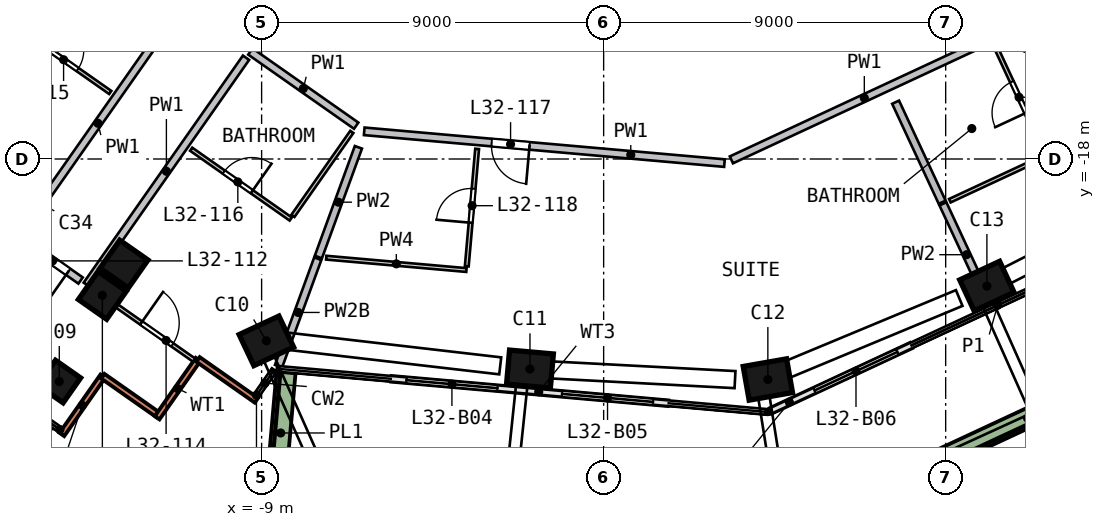
"""IFC4 building model, lengths in metres.
Left out: names, types, materials, properties, quantities, classifications, styles, units other than length and angle.
Written with IfcOpenShell. Run it as: python <this file> out.ifc"""

import sys

from ifc_helpers import new_model, si_unit, direction, frame, frame_2d, origin, origin_2d, place, context, subcontext, project, spatial, rectangle, extrude, element, fill, save


model = new_model("IFC4")
c1 = context("Model", 3, precision=1e-05, world=origin(), true_north=direction((0.0, 1.0)))
c2 = subcontext(c1, "Body", "Model", "MODEL_VIEW")
j1 = project(units=[si_unit("LENGTHUNIT", "METRE"), si_unit("PLANEANGLEUNIT", "RADIAN")], contexts=[c1])
p1 = place(None, origin())
s1 = spatial("IfcSite", under=j1, at=p1, CompositionType="ELEMENT")
p2 = place(p1, origin())
s2 = spatial("IfcBuilding", under=s1, at=p2, CompositionType="ELEMENT")
p3 = place(p2, frame((0.0, 0.0, 136.5)))
s3 = spatial("IfcBuildingStorey", under=s2, at=p3, CompositionType="ELEMENT", Elevation=136.5)
p4 = place(p3, frame((-14.461, -23.775, 0.0), z_axis=(0.113416824, -0.067670774, 0.991240279), x_axis=(0.810958398, -0.570087188, -0.131708295)))
e1 = element("IfcColumn", 1, at=p4, inside=s3, PredefinedType="COLUMN", context=c2, shape_type="SweptSolid", body=[
    extrude(rectangle(XDim=0.8, YDim=0.8, at=origin_2d()), origin(), (0.0, 0.0, 1.0), 3.218),
])
p5 = place(p3, frame((-9.006, -22.735, 0.0), z_axis=(0.108473902, -0.041884457, 0.993216545), x_axis=(-0.90066997, -0.427008184, 0.080359294)))
e2 = element("IfcColumn", 2, at=p5, inside=s3, PredefinedType="COLUMN", context=c2, shape_type="SweptSolid", body=[
    extrude(rectangle(XDim=1.15, YDim=0.9, at=origin_2d()), origin(), (0.0, 0.0, 1.0), 3.212),
])
p6 = place(p3, frame((-2.074, -23.517, 0.0), z_axis=(0.111946178, -0.008897896, 0.993674434), x_axis=(0.989847104, -0.087134884, -0.112295249)))
e3 = element("IfcColumn", 3, at=p6, inside=s3, PredefinedType="COLUMN", context=c2, shape_type="SweptSolid", body=[
    extrude(rectangle(XDim=1.15, YDim=0.9, at=origin_2d()), origin(), (0.0, 0.0, 1.0), 3.21),
])
p7 = place(p3, frame((4.184, -23.828, 0.0), z_axis=(0.113127235, 0.020907251, 0.993360516), x_axis=(-0.978316643, -0.172228343, 0.115038876)))
e4 = element("IfcColumn", 4, at=p7, inside=s3, PredefinedType="COLUMN", context=c2, shape_type="SweptSolid", body=[
    extrude(rectangle(XDim=1.15, YDim=0.9, at=origin_2d()), origin(), (0.0, 0.0, 1.0), 3.211),
])
p8 = place(p3, frame((9.962, -21.403, 0.0), z_axis=(0.101375651, 0.048216176, 0.993679112), x_axis=(0.90094221, 0.419168471, -0.112253848)))
e5 = element("IfcColumn", 5, at=p8, inside=s3, PredefinedType="COLUMN", context=c2, shape_type="SweptSolid", body=[
    extrude(rectangle(XDim=1.15, YDim=0.9, at=origin_2d()), origin(), (0.0, 0.0, 1.0), 3.21),
])
p9 = place(p3, frame((-12.741, -20.694, 0.0), z_axis=(0.098904408, -0.059753163, 0.993301303), x_axis=(-0.573373422, -0.81925695, 0.00780827)))
e6 = element("IfcColumn", 6, at=p9, inside=s3, PredefinedType="COLUMN", context=c2, shape_type="SweptSolid", body=[
    extrude(rectangle(XDim=0.9, YDim=0.9, at=origin_2d()), origin(), (0.0, 0.0, 1.0), 3.211),
])
p10 = place(p3, frame((-13.315, -21.513, 0.0), z_axis=(0.102724191, -0.062455093, 0.99274725), x_axis=(-0.573707052, -0.819023064, 0.007838281)))
e7 = element("IfcColumn", 7, at=p10, inside=s3, PredefinedType="COLUMN", context=c2, shape_type="SweptSolid", body=[
    extrude(rectangle(XDim=0.9, YDim=0.9, at=origin_2d()), origin(), (0.0, 0.0, 1.0), 3.213),
])
p11 = place(p3, frame((-14.256, -25.25, 0.0), z_axis=(0.0, 0.0, 1.0), x_axis=(0.574196146, 0.81871777, 0.0)))
e8 = element("IfcWall", 8, at=p11, inside=s3, PredefinedType="SOLIDWALL", context=c2, shape_type="SweptSolid", body=[
    extrude(rectangle(XDim=1.875, YDim=0.15, at=frame_2d((0.938, 0.0))), origin(), (0.0, 0.0, 1.0), 3.19),
])
p12 = place(p3, frame((-13.179, -23.715, 0.0), z_axis=(0.0, 0.0, 1.0), x_axis=(0.818734563, -0.574172201, 0.0)))
e9 = element("IfcWall", 9, at=p12, inside=s3, PredefinedType="SOLIDWALL", context=c2, shape_type="SweptSolid", body=[
    extrude(rectangle(XDim=1.8, YDim=0.15, at=frame_2d((0.9, 0.0))), origin(), (0.0, 0.0, 1.0), 3.19),
])
for number, where, z_axis, x_axis in (
    (10, (-11.749, -24.81, 0.0), (0.0, 0.0, 1.0), (0.574, 0.819, 0.0)),
    (11, (-10.672, -23.274, 0.0), (0.0, 0.0, 1.0), (0.819, -0.574, 0.0)),
):
    element("IfcWall", number, at=place(p3, frame(where, z_axis=z_axis, x_axis=x_axis)), inside=s3, PredefinedType="SOLIDWALL", context=c2, shape_type="SweptSolid", body=[
        extrude(rectangle(XDim=1.875, YDim=0.15, at=frame_2d((0.938, 0.0))), origin(), (0.0, 0.0, 1.0), 3.19),
    ])
p13 = place(p3, frame((-5.586, -23.784, 0.0), z_axis=(0.0, 0.0, 1.0), x_axis=(0.996130393, -0.087887659, 0.0)))
e12 = element("IfcWall", 12, at=p13, inside=s3, PredefinedType="SOLIDWALL", context=c2, shape_type="SweptSolid", body=[
    extrude(rectangle(XDim=3.475, YDim=0.15, at=frame_2d((1.738, 0.0))), origin(), (0.0, 0.0, 1.0), 2.475),
])
p14 = place(p13, frame((0.4, 0.0, 0.0)))
e13 = element("IfcOpeningElement", 13, at=p14, cuts=e12, PredefinedType="OPENING", context=c2, shape_type="SweptSolid", body=[
    extrude(rectangle(XDim=2.4, YDim=2.4, at=frame_2d((1.2, 1.2))), frame((0.0, 0.085, 0.0), z_axis=(0.0, -1.0, 0.0), x_axis=(1.0, 0.0, 0.0)), (0.0, 0.0, 1.0), 0.17),
])
p15 = place(p3, frame((-2.125, -24.09, 0.0), z_axis=(0.0, 0.0, 1.0), x_axis=(0.996134275, -0.087843651, 0.0)))
e14 = element("IfcWall", 14, at=p15, inside=s3, PredefinedType="SOLIDWALL", context=c2, shape_type="SweptSolid", body=[
    extrude(rectangle(XDim=3.835, YDim=0.15, at=frame_2d((1.918, 0.0))), origin(), (0.0, 0.0, 1.0), 2.475),
])
p16 = place(p15, frame((1.035, 0.0, 0.0)))
e15 = element("IfcOpeningElement", 15, at=p16, cuts=e14, PredefinedType="OPENING", context=c2, shape_type="SweptSolid", body=[
    extrude(rectangle(XDim=2.4, YDim=2.4, at=frame_2d((1.2, 1.2))), frame((0.0, 0.085, 0.0), z_axis=(0.0, -1.0, 0.0), x_axis=(1.0, 0.0, 0.0)), (0.0, 0.0, 1.0), 0.17),
])
p17 = place(p3, frame((4.403, -24.625, 0.0), z_axis=(0.0, 0.0, 1.0), x_axis=(0.906607397, 0.42197515, 0.0)))
e16 = element("IfcWall", 16, at=p17, inside=s3, PredefinedType="SOLIDWALL", context=c2, shape_type="SweptSolid", body=[
    extrude(rectangle(XDim=4.068, YDim=0.15, at=frame_2d((2.034, 0.0))), origin(), (0.0, 0.0, 1.0), 2.475),
])
p18 = place(p17, frame((1.268, 0.0, 0.0)))
e17 = element("IfcOpeningElement", 17, at=p18, cuts=e16, PredefinedType="OPENING", context=c2, shape_type="SweptSolid", body=[
    extrude(rectangle(XDim=2.4, YDim=2.4, at=frame_2d((1.2, 1.2))), frame((0.0, 0.085, 0.0), z_axis=(0.0, -1.0, 0.0), x_axis=(1.0, 0.0, 0.0)), (0.0, 0.0, 1.0), 0.17),
])
p19 = place(p3, frame((-8.357, -23.616, 0.0), z_axis=(0.0, 0.0, 1.0), x_axis=(-0.087920539, -0.996127491, 0.0)))
e18 = element("IfcWall", 18, at=p19, inside=s3, PredefinedType="SOLIDWALL", context=c2, shape_type="SweptSolid", body=[
    extrude(rectangle(XDim=3.199, YDim=0.5, at=frame_2d((1.6, 0.0))), origin(), (0.0, 0.0, 1.0), 0.7),
])
p20 = place(p3, frame((4.933, -27.715, 0.0), z_axis=(0.0, 0.0, 1.0), x_axis=(0.906607173, 0.421975632, 0.0)))
e19 = element("IfcWall", 19, at=p20, inside=s3, PredefinedType="SOLIDWALL", context=c2, shape_type="SweptSolid", body=[
    extrude(rectangle(XDim=13.724, YDim=0.5, at=frame_2d((6.862, 0.0))), origin(), (0.0, 0.0, 1.0), 0.7),
])
p21 = place(p3, frame((-13.763, -21.198, 0.0), z_axis=(0.0, 0.0, 1.0), x_axis=(-0.81872299, 0.574188702, 0.0)))
e20 = element("IfcWall", 20, at=p21, inside=s3, PredefinedType="SOLIDWALL", context=c2, shape_type="SweptSolid", body=[
    extrude(rectangle(XDim=1.804, YDim=0.2, at=frame_2d((0.902, 0.0))), origin(), (0.0, 0.0, 1.0), 3.19),
])
p22 = place(p21, frame((0.4, 0.0, 0.0)))
e21 = element("IfcOpeningElement", 21, at=p22, cuts=e20, PredefinedType="OPENING", context=c2, shape_type="SweptSolid", body=[
    extrude(rectangle(XDim=1.0, YDim=2.1, at=frame_2d((0.5, 1.05))), frame((0.0, 0.11, 0.0), z_axis=(0.0, -1.0, 0.0), x_axis=(1.0, 0.0, 0.0)), (0.0, 0.0, 1.0), 0.22),
])
p23 = place(p3, frame((-11.211, -14.072, 0.0), z_axis=(0.0, 0.0, 1.0), x_axis=(-0.57414226, -0.818755559, 0.0)))
e22 = element("IfcWall", 22, at=p23, inside=s3, PredefinedType="SOLIDWALL", context=c2, shape_type="SweptSolid", body=[
    extrude(rectangle(XDim=7.3, YDim=0.2, at=frame_2d((3.65, 0.0))), origin(), (0.0, 0.0, 1.0), 3.19),
])
p24 = place(p3, frame((-13.601, -21.312, 0.0), z_axis=(0.0, 0.0, 1.0), x_axis=(0.574126539, 0.818766583, 0.0)))
e23 = element("IfcWall", 23, at=p24, inside=s3, PredefinedType="SOLIDWALL", context=c2, shape_type="SweptSolid", body=[
    extrude(rectangle(XDim=7.3, YDim=0.2, at=frame_2d((3.65, 0.0))), origin(), (0.0, 0.0, 1.0), 3.19),
])
p25 = place(p3, frame((-9.295, -15.171, 0.0), z_axis=(0.0, 0.0, 1.0), x_axis=(0.818762763, -0.574131987, 0.0)))
e24 = element("IfcWall", 24, at=p25, inside=s3, PredefinedType="SOLIDWALL", context=c2, shape_type="SweptSolid", body=[
    extrude(rectangle(XDim=3.4, YDim=0.2, at=frame_2d((1.7, 0.0))), origin(), (0.0, 0.0, 1.0), 3.19),
])
p26 = place(p3, frame((3.179, -18.108, 0.0), z_axis=(0.0, 0.0, 1.0), x_axis=(-0.996131898, 0.087870599, 0.0)))
e25 = element("IfcWall", 25, at=p26, inside=s3, PredefinedType="SOLIDWALL", context=c2, shape_type="SweptSolid", body=[
    extrude(rectangle(XDim=9.516, YDim=0.2, at=frame_2d((4.758, 0.0))), origin(), (0.0, 0.0, 1.0), 3.19),
])
p27 = place(p26, frame((5.15, 0.0, 0.0)))
e26 = element("IfcOpeningElement", 26, at=p27, cuts=e25, PredefinedType="OPENING", context=c2, shape_type="SweptSolid", body=[
    extrude(rectangle(XDim=1.0, YDim=2.1, at=frame_2d((0.5, 1.05))), frame((0.0, 0.11, 0.0), z_axis=(0.0, -1.0, 0.0), x_axis=(1.0, 0.0, 0.0)), (0.0, 0.0, 1.0), 0.22),
])
p28 = place(p3, frame((11.626, -14.177, 0.0), z_axis=(0.0, 0.0, 1.0), x_axis=(-0.90660485, -0.421980622, 0.0)))
e27 = element("IfcWall", 27, at=p28, inside=s3, PredefinedType="SOLIDWALL", context=c2, shape_type="SweptSolid", body=[
    extrude(rectangle(XDim=9.116, YDim=0.2, at=frame_2d((4.558, 0.0))), origin(), (0.0, 0.0, 1.0), 3.19),
])
p29 = place(p28, frame((0.2, 0.0, 0.0)))
e28 = element("IfcOpeningElement", 28, at=p29, cuts=e27, PredefinedType="OPENING", context=c2, shape_type="SweptSolid", body=[
    extrude(rectangle(XDim=1.0, YDim=2.1, at=frame_2d((0.5, 1.05))), frame((0.0, 0.11, 0.0), z_axis=(0.0, -1.0, 0.0), x_axis=(1.0, 0.0, 0.0)), (0.0, 0.0, 1.0), 0.22),
])
p30 = place(p3, frame((-7.523, -20.624, 0.0), z_axis=(0.0, 0.0, 1.0), x_axis=(-0.342686746, -0.93944973, 0.0)))
e29 = element("IfcWall", 29, at=p30, inside=s3, PredefinedType="SOLIDWALL", context=c2, shape_type="SweptSolid", body=[
    extrude(rectangle(XDim=3.011, YDim=0.2, at=frame_2d((1.506, 0.0))), origin(), (0.0, 0.0, 1.0), 2.69),
])
p31 = place(p3, frame((-6.453, -17.692, 0.0), z_axis=(0.0, 0.0, 1.0), x_axis=(-0.342641889, -0.939466091, 0.0)))
e30 = element("IfcWall", 30, at=p31, inside=s3, PredefinedType="SOLIDWALL", context=c2, shape_type="SweptSolid", body=[
    extrude(rectangle(XDim=3.074, YDim=0.2, at=frame_2d((1.537, 0.0))), origin(), (0.0, 0.0, 1.0), 3.19),
])
p32 = place(p3, frame((7.683, -16.505, 0.0), z_axis=(0.0, 0.0, 1.0), x_axis=(0.421923577, -0.9066314, 0.0)))
e31 = element("IfcWall", 31, at=p32, inside=s3, PredefinedType="SOLIDWALL", context=c2, shape_type="SweptSolid", body=[
    extrude(rectangle(XDim=2.905, YDim=0.2, at=frame_2d((1.452, 0.0))), origin(), (0.0, 0.0, 1.0), 3.19),
])
p33 = place(p3, frame((8.928, -19.18, 0.0), z_axis=(0.0, 0.0, 1.0), x_axis=(0.421961604, -0.906613702, 0.0)))
e32 = element("IfcWall", 32, at=p33, inside=s3, PredefinedType="SOLIDWALL", context=c2, shape_type="SweptSolid", body=[
    extrude(rectangle(XDim=2.952, YDim=0.2, at=frame_2d((1.476, 0.0))), origin(), (0.0, 0.0, 1.0), 3.19),
])
p34 = place(p3, frame((-15.603, -14.412, 0.0), z_axis=(0.0, 0.0, 1.0), x_axis=(0.818744188, -0.574158475, 0.0)))
e33 = element("IfcWall", 33, at=p34, inside=s3, PredefinedType="PARTITIONING", context=c2, shape_type="SweptSolid", body=[
    extrude(rectangle(XDim=3.2, YDim=0.1, at=frame_2d((1.6, 0.0))), origin(), (0.0, 0.0, 1.0), 3.19),
])
p35 = place(p34, frame((1.25, 0.0, 0.0)))
e34 = element("IfcOpeningElement", 34, at=p35, cuts=e33, PredefinedType="OPENING", context=c2, shape_type="SweptSolid", body=[
    extrude(rectangle(XDim=0.9, YDim=2.1, at=frame_2d((0.45, 1.05))), frame((0.0, 0.06, 0.0), z_axis=(0.0, -1.0, 0.0), x_axis=(1.0, 0.0, 0.0)), (0.0, 0.0, 1.0), 0.12),
])
p36 = place(p3, frame((-13.438, -21.427, 0.0), z_axis=(0.0, 0.0, 1.0), x_axis=(0.818755455, -0.574142408, 0.0)))
e35 = element("IfcWall", 35, at=p36, inside=s3, PredefinedType="PARTITIONING", context=c2, shape_type="SweptSolid", body=[
    extrude(rectangle(XDim=3.252, YDim=0.1, at=frame_2d((1.626, 0.0))), origin(), (0.0, 0.0, 1.0), 3.19),
])
p37 = place(p36, frame((1.55, 0.0, 0.0)))
e36 = element("IfcOpeningElement", 36, at=p37, cuts=e35, PredefinedType="OPENING", context=c2, shape_type="SweptSolid", body=[
    extrude(rectangle(XDim=1.0, YDim=2.1, at=frame_2d((0.5, 1.05))), frame((0.0, 0.06, 0.0), z_axis=(0.0, -1.0, 0.0), x_axis=(1.0, 0.0, 0.0)), (0.0, 0.0, 1.0), 0.12),
])
p38 = place(p3, frame((-10.854, -17.742, 0.0), z_axis=(0.0, 0.0, 1.0), x_axis=(0.818744188, -0.574158475, 0.0)))
e37 = element("IfcWall", 37, at=p38, inside=s3, PredefinedType="PARTITIONING", context=c2, shape_type="SweptSolid", body=[
    extrude(rectangle(XDim=3.2, YDim=0.1, at=frame_2d((1.6, 0.0))), origin(), (0.0, 0.0, 1.0), 3.19),
])
p39 = place(p38, frame((1.05, 0.0, 0.0)))
e38 = element("IfcOpeningElement", 38, at=p39, cuts=e37, PredefinedType="OPENING", context=c2, shape_type="SweptSolid", body=[
    extrude(rectangle(XDim=0.9, YDim=2.1, at=frame_2d((0.45, 1.05))), frame((0.0, 0.06, 0.0), z_axis=(0.0, -1.0, 0.0), x_axis=(1.0, 0.0, 0.0)), (0.0, 0.0, 1.0), 0.12),
])
p40 = place(p3, frame((-8.177, -19.498, 0.0), z_axis=(0.0, 0.0, 1.0), x_axis=(0.574099384, 0.818785623, 0.0)))
e39 = element("IfcWall", 39, at=p40, inside=s3, PredefinedType="PARTITIONING", context=c2, shape_type="SweptSolid", body=[
    extrude(rectangle(XDim=2.7, YDim=0.1, at=frame_2d((1.35, 0.0))), origin(), (0.0, 0.0, 1.0), 3.19),
])
p41 = place(p3, frame((-3.61, -20.922, 0.0), z_axis=(0.0, 0.0, 1.0), x_axis=(-0.996132735, 0.087861109, 0.0)))
e40 = element("IfcWall", 40, at=p41, inside=s3, PredefinedType="PARTITIONING", context=c2, shape_type="SweptSolid", body=[
    extrude(rectangle(XDim=3.704, YDim=0.1, at=frame_2d((1.852, 0.0))), origin(), (0.0, 0.0, 1.0), 3.19),
])
p42 = place(p3, frame((-3.602, -20.823, 0.0), z_axis=(0.0, 0.0, 1.0), x_axis=(0.087886915, 0.996130458, 0.0)))
e41 = element("IfcWall", 41, at=p42, inside=s3, PredefinedType="PARTITIONING", context=c2, shape_type="SweptSolid", body=[
    extrude(rectangle(XDim=3.1, YDim=0.1, at=frame_2d((1.55, 0.0))), origin(), (0.0, 0.0, 1.0), 3.19),
])
p43 = place(p42, frame((1.15, 0.0, 0.0)))
e42 = element("IfcOpeningElement", 42, at=p43, cuts=e41, PredefinedType="OPENING", context=c2, shape_type="SweptSolid", body=[
    extrude(rectangle(XDim=0.9, YDim=2.1, at=frame_2d((0.45, 1.05))), frame((0.0, 0.06, 0.0), z_axis=(0.0, -1.0, 0.0), x_axis=(1.0, 0.0, 0.0)), (0.0, 0.0, 1.0), 0.12),
])
p44 = place(p3, frame((11.558, -17.958, 0.0), z_axis=(0.0, 0.0, 1.0), x_axis=(-0.906591605, -0.422009078, 0.0)))
e43 = element("IfcWall", 43, at=p44, inside=s3, PredefinedType="PARTITIONING", context=c2, shape_type="SweptSolid", body=[
    extrude(rectangle(XDim=2.7, YDim=0.1, at=frame_2d((1.35, 0.0))), origin(), (0.0, 0.0, 1.0), 3.19),
])
p45 = place(p3, frame((11.648, -17.916, 0.0), z_axis=(0.0, 0.0, 1.0), x_axis=(-0.42192038, 0.906632888, 0.0)))
e44 = element("IfcWall", 44, at=p45, inside=s3, PredefinedType="PARTITIONING", context=c2, shape_type="SweptSolid", body=[
    extrude(rectangle(XDim=3.2, YDim=0.1, at=frame_2d((1.6, 0.0))), origin(), (0.0, 0.0, 1.0), 3.19),
])
p46 = place(p45, frame((1.25, 0.0, 0.0)))
e45 = element("IfcOpeningElement", 45, at=p46, cuts=e44, PredefinedType="OPENING", context=c2, shape_type="SweptSolid", body=[
    extrude(rectangle(XDim=0.9, YDim=2.1, at=frame_2d((0.45, 1.05))), frame((0.0, 0.06, 0.0), z_axis=(0.0, -1.0, 0.0), x_axis=(1.0, 0.0, 0.0)), (0.0, 0.0, 1.0), 0.12),
])
p47 = place(p14, origin())
e46 = element("IfcDoor", 46, at=p47, inside=s3, OperationType="SLIDING_TO_RIGHT", PredefinedType="DOOR", context=c2, shape_type="SweptSolid", body=[
    extrude(rectangle(XDim=2.4, YDim=2.4, at=frame_2d((1.2, 1.2))), frame((0.0, 0.025, 0.0), z_axis=(0.0, -1.0, 0.0), x_axis=(1.0, 0.0, 0.0)), (0.0, 0.0, 1.0), 0.05),
])
fill(e13, e46)
p48 = place(p16, origin())
e47 = element("IfcDoor", 47, at=p48, inside=s3, OperationType="SLIDING_TO_LEFT", PredefinedType="DOOR", context=c2, shape_type="SweptSolid", body=[
    extrude(rectangle(XDim=2.4, YDim=2.4, at=frame_2d((1.2, 1.2))), frame((0.0, 0.025, 0.0), z_axis=(0.0, -1.0, 0.0), x_axis=(1.0, 0.0, 0.0)), (0.0, 0.0, 1.0), 0.05),
])
fill(e15, e47)
p49 = place(p18, origin())
e48 = element("IfcDoor", 48, at=p49, inside=s3, OperationType="SLIDING_TO_LEFT", PredefinedType="DOOR", context=c2, shape_type="SweptSolid", body=[
    extrude(rectangle(XDim=2.4, YDim=2.4, at=frame_2d((1.2, 1.2))), frame((0.0, 0.025, 0.0), z_axis=(0.0, -1.0, 0.0), x_axis=(1.0, 0.0, 0.0)), (0.0, 0.0, 1.0), 0.05),
])
fill(e17, e48)
p50 = place(p22, origin())
e49 = element("IfcDoor", 49, at=p50, inside=s3, OperationType="SINGLE_SWING_LEFT", PredefinedType="DOOR", context=c2, shape_type="SweptSolid", body=[
    extrude(rectangle(XDim=1.0, YDim=2.1, at=frame_2d((0.5, 1.05))), frame((0.0, 0.025, 0.0), z_axis=(0.0, -1.0, 0.0), x_axis=(1.0, 0.0, 0.0)), (0.0, 0.0, 1.0), 0.05),
])
fill(e21, e49)
p51 = place(p37, origin())
e50 = element("IfcDoor", 50, at=p51, inside=s3, OperationType="SINGLE_SWING_LEFT", PredefinedType="DOOR", context=c2, shape_type="SweptSolid", body=[
    extrude(rectangle(XDim=1.0, YDim=2.1, at=frame_2d((0.5, 1.05))), frame((0.0, 0.025, 0.0), z_axis=(0.0, -1.0, 0.0), x_axis=(1.0, 0.0, 0.0)), (0.0, 0.0, 1.0), 0.05),
])
fill(e36, e50)
p52 = place(p35, origin())
e51 = element("IfcDoor", 51, at=p52, inside=s3, OperationType="SINGLE_SWING_LEFT", PredefinedType="DOOR", context=c2, shape_type="SweptSolid", body=[
    extrude(rectangle(XDim=0.9, YDim=2.1, at=frame_2d((0.45, 1.05))), frame((0.0, 0.025, 0.0), z_axis=(0.0, -1.0, 0.0), x_axis=(1.0, 0.0, 0.0)), (0.0, 0.0, 1.0), 0.05),
])
fill(e34, e51)
p53 = place(p39, origin())
e52 = element("IfcDoor", 52, at=p53, inside=s3, OperationType="SINGLE_SWING_RIGHT", PredefinedType="DOOR", context=c2, shape_type="SweptSolid", body=[
    extrude(rectangle(XDim=0.9, YDim=2.1, at=frame_2d((0.45, 1.05))), frame((0.0, 0.025, 0.0), z_axis=(0.0, -1.0, 0.0), x_axis=(1.0, 0.0, 0.0)), (0.0, 0.0, 1.0), 0.05),
])
fill(e38, e52)
p54 = place(p27, origin())
e53 = element("IfcDoor", 53, at=p54, inside=s3, OperationType="SINGLE_SWING_LEFT", PredefinedType="DOOR", context=c2, shape_type="SweptSolid", body=[
    extrude(rectangle(XDim=1.0, YDim=2.1, at=frame_2d((0.5, 1.05))), frame((0.0, 0.025, 0.0), z_axis=(0.0, -1.0, 0.0), x_axis=(1.0, 0.0, 0.0)), (0.0, 0.0, 1.0), 0.05),
])
fill(e26, e53)
p55 = place(p43, origin())
e54 = element("IfcDoor", 54, at=p55, inside=s3, OperationType="SINGLE_SWING_LEFT", PredefinedType="DOOR", context=c2, shape_type="SweptSolid", body=[
    extrude(rectangle(XDim=0.9, YDim=2.1, at=frame_2d((0.45, 1.05))), frame((0.0, 0.025, 0.0), z_axis=(0.0, -1.0, 0.0), x_axis=(1.0, 0.0, 0.0)), (0.0, 0.0, 1.0), 0.05),
])
fill(e42, e54)
p56 = place(p46, origin())
e55 = element("IfcDoor", 55, at=p56, inside=s3, OperationType="SINGLE_SWING_LEFT", PredefinedType="DOOR", context=c2, shape_type="SweptSolid", body=[
    extrude(rectangle(XDim=0.9, YDim=2.1, at=frame_2d((0.45, 1.05))), frame((0.0, 0.025, 0.0), z_axis=(0.0, -1.0, 0.0), x_axis=(1.0, 0.0, 0.0)), (0.0, 0.0, 1.0), 0.05),
])
fill(e45, e55)
save(model, sys.argv[1])
